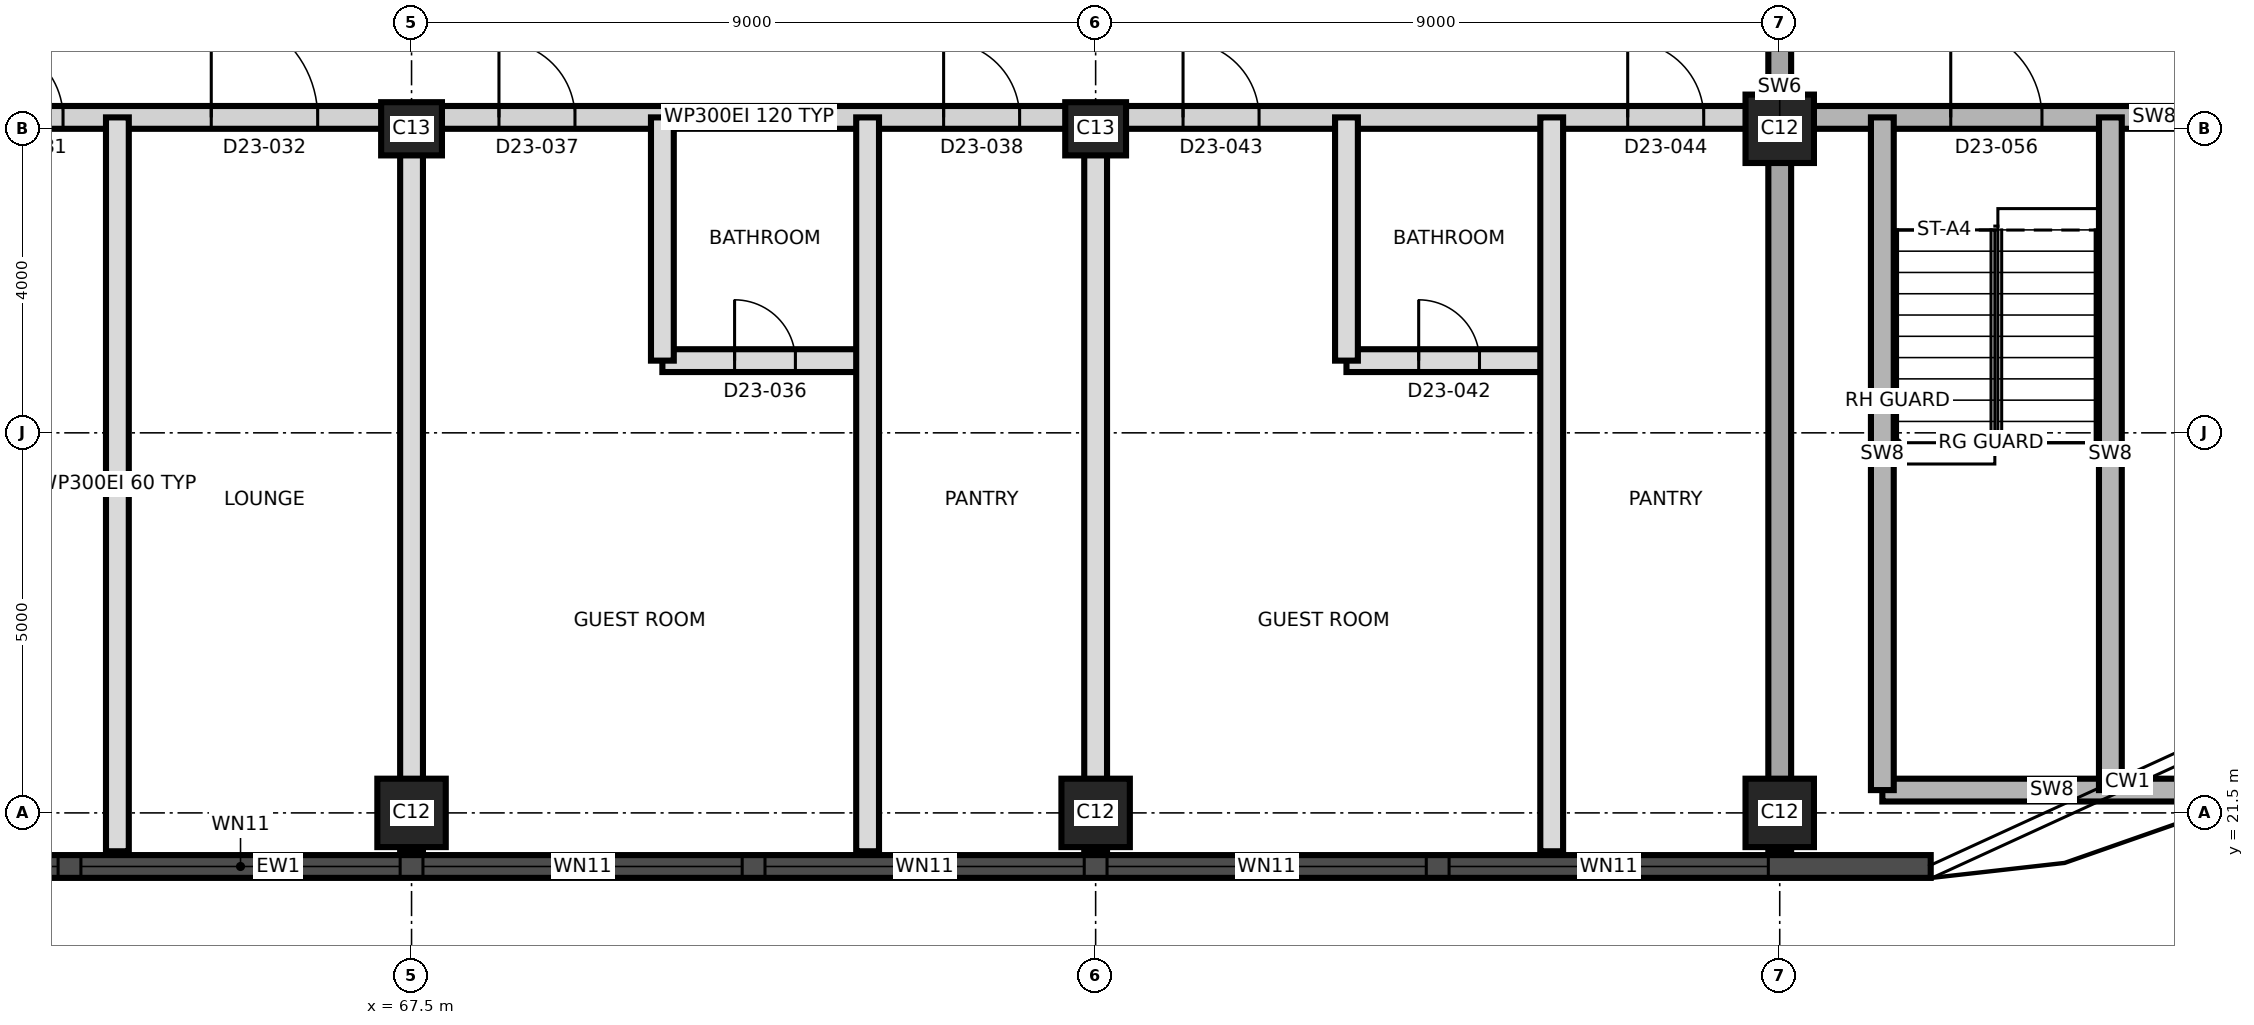
"""IFC4 building model, lengths in metres.
Left out: names, types, materials, properties, quantities, classifications, styles, units other than length and angle.
Written with IfcOpenShell. Run it as: python <this file> out.ifc"""

import sys

from ifc_helpers import new_model, si_unit, direction, frame, frame_2d, origin, origin_2d, place, context, subcontext, project, spatial, rectangle, extrude, element, fill, save


model = new_model("IFC4")
c1 = context("Model", 3, precision=1e-05, world=origin(), true_north=direction((0.0, 1.0)))
c2 = subcontext(c1, "Body", "Model", "MODEL_VIEW")
j1 = project(units=[si_unit("LENGTHUNIT", "METRE"), si_unit("PLANEANGLEUNIT", "RADIAN")], contexts=[c1])
p1 = place(None, origin())
s1 = spatial("IfcSite", under=j1, at=p1, CompositionType="ELEMENT")
p2 = place(p1, origin())
s2 = spatial("IfcBuilding", under=s1, at=p2, CompositionType="ELEMENT")
p3 = place(p2, frame((0.0, 0.0, 206.9)))
s3 = spatial("IfcBuildingStorey", under=s2, at=p3, CompositionType="ELEMENT", Elevation=206.9)
for number, where, z_axis, x_axis in (
    (1, (67.5, 21.5, 0.0), (0.0, 0.0, 1.0), (1.0, 0.0, 0.0)),
    (2, (76.5, 21.5, 0.0), (0.0, 0.0, 1.0), (1.0, 0.0, 0.0)),
    (3, (85.5, 21.5, 0.0), (0.0, 0.0, 1.0), (1.0, 0.0, 0.0)),
):
    element("IfcColumn", number, at=place(p3, frame(where, z_axis=z_axis, x_axis=x_axis)), inside=s3, PredefinedType="COLUMN", context=c2, shape_type="SweptSolid", body=[
        extrude(rectangle(XDim=0.9, YDim=0.9, at=origin_2d()), origin(), (0.0, 0.0, 1.0), 3.7),
    ])
for number, where, z_axis, x_axis in (
    (4, (67.5, 30.5, 0.0), (0.0, 0.0, 1.0), (1.0, 0.0, 0.0)),
    (5, (76.5, 30.5, 0.0), (0.0, 0.0, 1.0), (1.0, 0.0, 0.0)),
):
    element("IfcColumn", number, at=place(p3, frame(where, z_axis=z_axis, x_axis=x_axis)), inside=s3, PredefinedType="COLUMN", context=c2, shape_type="SweptSolid", body=[
        extrude(rectangle(XDim=0.8, YDim=0.7, at=origin_2d()), origin(), (0.0, 0.0, 1.0), 3.7),
    ])
p4 = place(p3, frame((85.5, 30.5, 0.0), z_axis=(0.0, 0.0, 1.0), x_axis=(1.0, 0.0, 0.0)))
e6 = element("IfcColumn", 6, at=p4, inside=s3, PredefinedType="COLUMN", context=c2, shape_type="SweptSolid", body=[
    extrude(rectangle(XDim=0.9, YDim=0.9, at=origin_2d()), origin(), (0.0, 0.0, 1.0), 3.7),
])
p5 = place(p3, frame((85.5, 20.995, 0.0), z_axis=(0.0, 0.0, 1.0), x_axis=(0.0, 1.0, 0.0)))
e7 = element("IfcWall", 7, at=p5, inside=s3, PredefinedType="SHEAR", context=c2, shape_type="SweptSolid", body=[
    extrude(rectangle(XDim=19.01, YDim=0.3, at=frame_2d((9.505, 0.0))), origin(), (0.0, 0.0, 1.0), 3.7),
])
p6 = place(p5, frame((10.705, 0.0, 0.0)))
e8 = element("IfcOpeningElement", 8, at=p6, cuts=e7, PredefinedType="OPENING", context=c2, shape_type="SweptSolid", body=[
    extrude(rectangle(XDim=1.4, YDim=2.1, at=frame_2d((0.7, 1.05))), frame((0.0, 0.16, 0.0), z_axis=(0.0, -1.0, 0.0), x_axis=(1.0, 0.0, 0.0)), (0.0, 0.0, 1.0), 0.32),
])
p7 = place(p3, frame((44.011, 20.795, 0.0), z_axis=(0.0, 0.0, 1.0), x_axis=(1.0, 0.0, 0.0)))
e9 = element("IfcWall", 9, at=p7, inside=s3, PredefinedType="SOLIDWALL", context=c2, shape_type="SweptSolid", body=[
    extrude(rectangle(XDim=43.476, YDim=0.3, at=frame_2d((21.738, 0.0))), origin(), (0.0, 0.0, 1.0), 3.4),
])
p8 = place(p7, frame((1.845, 0.0, 0.3)))
e10 = element("IfcOpeningElement", 10, at=p8, cuts=e9, PredefinedType="OPENING", context=c2, shape_type="SweptSolid", body=[
    extrude(rectangle(XDim=1.8, YDim=2.4, at=frame_2d((0.9, 1.2))), frame((0.0, 0.16, 0.0), z_axis=(0.0, -1.0, 0.0), x_axis=(1.0, 0.0, 0.0)), (0.0, 0.0, 1.0), 0.32),
])
p9 = place(p7, frame((5.639, 0.0, 0.9)))
e11 = element("IfcOpeningElement", 11, at=p9, cuts=e9, PredefinedType="OPENING", context=c2, shape_type="SweptSolid", body=[
    extrude(rectangle(XDim=4.2, YDim=1.5, at=frame_2d((2.1, 0.75))), frame((0.0, 0.16, 0.0), z_axis=(0.0, -1.0, 0.0), x_axis=(1.0, 0.0, 0.0)), (0.0, 0.0, 1.0), 0.32),
])
p10 = place(p7, frame((10.139, 0.0, 0.9)))
e12 = element("IfcOpeningElement", 12, at=p10, cuts=e9, PredefinedType="OPENING", context=c2, shape_type="SweptSolid", body=[
    extrude(rectangle(XDim=4.2, YDim=1.5, at=frame_2d((2.1, 0.75))), frame((0.0, 0.16, 0.0), z_axis=(0.0, -1.0, 0.0), x_axis=(1.0, 0.0, 0.0)), (0.0, 0.0, 1.0), 0.32),
])
p11 = place(p7, frame((14.639, 0.0, 0.9)))
e13 = element("IfcOpeningElement", 13, at=p11, cuts=e9, PredefinedType="OPENING", context=c2, shape_type="SweptSolid", body=[
    extrude(rectangle(XDim=4.2, YDim=1.5, at=frame_2d((2.1, 0.75))), frame((0.0, 0.16, 0.0), z_axis=(0.0, -1.0, 0.0), x_axis=(1.0, 0.0, 0.0)), (0.0, 0.0, 1.0), 0.32),
])
p12 = place(p7, frame((19.139, 0.0, 0.9)))
e14 = element("IfcOpeningElement", 14, at=p12, cuts=e9, PredefinedType="OPENING", context=c2, shape_type="SweptSolid", body=[
    extrude(rectangle(XDim=4.2, YDim=1.5, at=frame_2d((2.1, 0.75))), frame((0.0, 0.16, 0.0), z_axis=(0.0, -1.0, 0.0), x_axis=(1.0, 0.0, 0.0)), (0.0, 0.0, 1.0), 0.32),
])
p13 = place(p7, frame((23.639, 0.0, 0.9)))
e15 = element("IfcOpeningElement", 15, at=p13, cuts=e9, PredefinedType="OPENING", context=c2, shape_type="SweptSolid", body=[
    extrude(rectangle(XDim=4.2, YDim=1.5, at=frame_2d((2.1, 0.75))), frame((0.0, 0.16, 0.0), z_axis=(0.0, -1.0, 0.0), x_axis=(1.0, 0.0, 0.0)), (0.0, 0.0, 1.0), 0.32),
])
p14 = place(p7, frame((28.139, 0.0, 0.9)))
e16 = element("IfcOpeningElement", 16, at=p14, cuts=e9, PredefinedType="OPENING", context=c2, shape_type="SweptSolid", body=[
    extrude(rectangle(XDim=4.2, YDim=1.5, at=frame_2d((2.1, 0.75))), frame((0.0, 0.16, 0.0), z_axis=(0.0, -1.0, 0.0), x_axis=(1.0, 0.0, 0.0)), (0.0, 0.0, 1.0), 0.32),
])
p15 = place(p7, frame((32.639, 0.0, 0.9)))
e17 = element("IfcOpeningElement", 17, at=p15, cuts=e9, PredefinedType="OPENING", context=c2, shape_type="SweptSolid", body=[
    extrude(rectangle(XDim=4.2, YDim=1.5, at=frame_2d((2.1, 0.75))), frame((0.0, 0.16, 0.0), z_axis=(0.0, -1.0, 0.0), x_axis=(1.0, 0.0, 0.0)), (0.0, 0.0, 1.0), 0.32),
])
p16 = place(p7, frame((37.139, 0.0, 0.9)))
e18 = element("IfcOpeningElement", 18, at=p16, cuts=e9, PredefinedType="OPENING", context=c2, shape_type="SweptSolid", body=[
    extrude(rectangle(XDim=4.2, YDim=1.5, at=frame_2d((2.1, 0.75))), frame((0.0, 0.16, 0.0), z_axis=(0.0, -1.0, 0.0), x_axis=(1.0, 0.0, 0.0)), (0.0, 0.0, 1.0), 0.32),
])
p17 = place(p3, frame((86.85, 21.8, 0.0), z_axis=(0.0, 0.0, 1.0), x_axis=(1.0, 0.0, 0.0)))
e19 = element("IfcWall", 19, at=p17, inside=s3, PredefinedType="SHEAR", context=c2, shape_type="SweptSolid", body=[
    extrude(rectangle(XDim=4.46, YDim=0.3, at=frame_2d((2.23, 0.0))), origin(), (0.0, 0.0, 1.0), 3.4),
])
p18 = place(p3, frame((70.8, 27.45, 0.0), z_axis=(0.0, 0.0, 1.0), x_axis=(1.0, 0.0, 0.0)))
e20 = element("IfcWall", 20, at=p18, inside=s3, PredefinedType="PARTITIONING", context=c2, shape_type="SweptSolid", body=[
    extrude(rectangle(XDim=2.7, YDim=0.3, at=frame_2d((1.35, 0.0))), origin(), (0.0, 0.0, 1.0), 3.4),
])
p19 = place(p18, frame((0.95, 0.0, 0.0)))
e21 = element("IfcOpeningElement", 21, at=p19, cuts=e20, PredefinedType="OPENING", context=c2, shape_type="SweptSolid", body=[
    extrude(rectangle(XDim=0.8, YDim=2.1, at=frame_2d((0.4, 1.05))), frame((0.0, 0.16, 0.0), z_axis=(0.0, -1.0, 0.0), x_axis=(1.0, 0.0, 0.0)), (0.0, 0.0, 1.0), 0.32),
])
p20 = place(p3, frame((79.8, 27.45, 0.0), z_axis=(0.0, 0.0, 1.0), x_axis=(1.0, 0.0, 0.0)))
e22 = element("IfcWall", 22, at=p20, inside=s3, PredefinedType="PARTITIONING", context=c2, shape_type="SweptSolid", body=[
    extrude(rectangle(XDim=2.7, YDim=0.3, at=frame_2d((1.35, 0.0))), origin(), (0.0, 0.0, 1.0), 3.4),
])
p21 = place(p20, frame((0.95, 0.0, 0.0)))
e23 = element("IfcOpeningElement", 23, at=p21, cuts=e22, PredefinedType="OPENING", context=c2, shape_type="SweptSolid", body=[
    extrude(rectangle(XDim=0.8, YDim=2.1, at=frame_2d((0.4, 1.05))), frame((0.0, 0.16, 0.0), z_axis=(0.0, -1.0, 0.0), x_axis=(1.0, 0.0, 0.0)), (0.0, 0.0, 1.0), 0.32),
])
p22 = place(p3, frame((58.55, 30.65, 0.0), z_axis=(0.0, 0.0, 1.0), x_axis=(1.0, 0.0, 0.0)))
e24 = element("IfcWall", 24, at=p22, inside=s3, PredefinedType="PARTITIONING", context=c2, shape_type="SweptSolid", body=[
    extrude(rectangle(XDim=26.78, YDim=0.3, at=frame_2d((13.39, 0.0))), origin(), (0.0, 0.0, 1.0), 3.4),
])
p23 = place(p22, frame((3.365, 0.0, 0.0)))
e25 = element("IfcOpeningElement", 25, at=p23, cuts=e24, PredefinedType="OPENING", context=c2, shape_type="SweptSolid", body=[
    extrude(rectangle(XDim=1.0, YDim=2.1, at=frame_2d((0.5, 1.05))), frame((0.0, 0.16, 0.0), z_axis=(0.0, -1.0, 0.0), x_axis=(1.0, 0.0, 0.0)), (0.0, 0.0, 1.0), 0.32),
])
p24 = place(p22, frame((6.315, 0.0, 0.0)))
e26 = element("IfcOpeningElement", 26, at=p24, cuts=e24, PredefinedType="OPENING", context=c2, shape_type="SweptSolid", body=[
    extrude(rectangle(XDim=1.4, YDim=2.1, at=frame_2d((0.7, 1.05))), frame((0.0, 0.16, 0.0), z_axis=(0.0, -1.0, 0.0), x_axis=(1.0, 0.0, 0.0)), (0.0, 0.0, 1.0), 0.32),
])
p25 = place(p22, frame((10.1, 0.0, 0.0)))
e27 = element("IfcOpeningElement", 27, at=p25, cuts=e24, PredefinedType="OPENING", context=c2, shape_type="SweptSolid", body=[
    extrude(rectangle(XDim=1.0, YDim=2.1, at=frame_2d((0.5, 1.05))), frame((0.0, 0.16, 0.0), z_axis=(0.0, -1.0, 0.0), x_axis=(1.0, 0.0, 0.0)), (0.0, 0.0, 1.0), 0.32),
])
p26 = place(p22, frame((15.95, 0.0, 0.0)))
e28 = element("IfcOpeningElement", 28, at=p26, cuts=e24, PredefinedType="OPENING", context=c2, shape_type="SweptSolid", body=[
    extrude(rectangle(XDim=1.0, YDim=2.1, at=frame_2d((0.5, 1.05))), frame((0.0, 0.16, 0.0), z_axis=(0.0, -1.0, 0.0), x_axis=(1.0, 0.0, 0.0)), (0.0, 0.0, 1.0), 0.32),
])
p27 = place(p22, frame((19.1, 0.0, 0.0)))
e29 = element("IfcOpeningElement", 29, at=p27, cuts=e24, PredefinedType="OPENING", context=c2, shape_type="SweptSolid", body=[
    extrude(rectangle(XDim=1.0, YDim=2.1, at=frame_2d((0.5, 1.05))), frame((0.0, 0.16, 0.0), z_axis=(0.0, -1.0, 0.0), x_axis=(1.0, 0.0, 0.0)), (0.0, 0.0, 1.0), 0.32),
])
p28 = place(p22, frame((24.95, 0.0, 0.0)))
e30 = element("IfcOpeningElement", 30, at=p28, cuts=e24, PredefinedType="OPENING", context=c2, shape_type="SweptSolid", body=[
    extrude(rectangle(XDim=1.0, YDim=2.1, at=frame_2d((0.5, 1.05))), frame((0.0, 0.16, 0.0), z_axis=(0.0, -1.0, 0.0), x_axis=(1.0, 0.0, 0.0)), (0.0, 0.0, 1.0), 0.32),
])
p29 = place(p3, frame((85.67, 30.65, 0.0), z_axis=(0.0, 0.0, 1.0), x_axis=(1.0, 0.0, 0.0)))
e31 = element("IfcWall", 31, at=p29, inside=s3, PredefinedType="SHEAR", context=c2, shape_type="SweptSolid", body=[
    extrude(rectangle(XDim=9.515, YDim=0.3, at=frame_2d((4.758, 0.0))), origin(), (0.0, 0.0, 1.0), 3.4),
])
p30 = place(p29, frame((2.08, 0.0, 0.0)))
e32 = element("IfcOpeningElement", 32, at=p30, cuts=e31, PredefinedType="OPENING", context=c2, shape_type="SweptSolid", body=[
    extrude(rectangle(XDim=1.2, YDim=2.1, at=frame_2d((0.6, 1.05))), frame((0.0, 0.16, 0.0), z_axis=(0.0, -1.0, 0.0), x_axis=(1.0, 0.0, 0.0)), (0.0, 0.0, 1.0), 0.32),
])
p31 = place(p29, frame((5.63, 0.0, 0.0)))
e33 = element("IfcOpeningElement", 33, at=p31, cuts=e31, PredefinedType="OPENING", context=c2, shape_type="SweptSolid", body=[
    extrude(rectangle(XDim=1.0, YDim=2.1, at=frame_2d((0.5, 1.05))), frame((0.0, 0.16, 0.0), z_axis=(0.0, -1.0, 0.0), x_axis=(1.0, 0.0, 0.0)), (0.0, 0.0, 1.0), 0.32),
])
for number, where, z_axis, x_axis in (
    (34, (63.63, 20.995, 0.0), (0.0, 0.0, 1.0), (0.0, 1.0, 0.0)),
    (35, (67.5, 20.995, 0.0), (0.0, 0.0, 1.0), (0.0, 1.0, 0.0)),
):
    element("IfcWall", number, at=place(p3, frame(where, z_axis=z_axis, x_axis=x_axis)), inside=s3, PredefinedType="PARTITIONING", context=c2, shape_type="SweptSolid", body=[
        extrude(rectangle(XDim=9.655, YDim=0.3, at=frame_2d((4.827, 0.0))), origin(), (0.0, 0.0, 1.0), 3.4),
    ])
p32 = place(p3, frame((70.8, 27.45, 0.0), z_axis=(0.0, 0.0, 1.0), x_axis=(0.0, 1.0, 0.0)))
e36 = element("IfcWall", 36, at=p32, inside=s3, PredefinedType="PARTITIONING", context=c2, shape_type="SweptSolid", body=[
    extrude(rectangle(XDim=3.2, YDim=0.3, at=frame_2d((1.6, 0.0))), origin(), (0.0, 0.0, 1.0), 3.4),
])
for number, where, z_axis, x_axis in (
    (37, (73.5, 20.995, 0.0), (0.0, 0.0, 1.0), (0.0, 1.0, 0.0)),
    (38, (76.5, 20.995, 0.0), (0.0, 0.0, 1.0), (0.0, 1.0, 0.0)),
):
    element("IfcWall", number, at=place(p3, frame(where, z_axis=z_axis, x_axis=x_axis)), inside=s3, PredefinedType="PARTITIONING", context=c2, shape_type="SweptSolid", body=[
        extrude(rectangle(XDim=9.655, YDim=0.3, at=frame_2d((4.827, 0.0))), origin(), (0.0, 0.0, 1.0), 3.4),
    ])
p33 = place(p3, frame((79.8, 27.45, 0.0), z_axis=(0.0, 0.0, 1.0), x_axis=(0.0, 1.0, 0.0)))
e39 = element("IfcWall", 39, at=p33, inside=s3, PredefinedType="PARTITIONING", context=c2, shape_type="SweptSolid", body=[
    extrude(rectangle(XDim=3.2, YDim=0.3, at=frame_2d((1.6, 0.0))), origin(), (0.0, 0.0, 1.0), 3.4),
])
p34 = place(p3, frame((82.5, 20.995, 0.0), z_axis=(0.0, 0.0, 1.0), x_axis=(0.0, 1.0, 0.0)))
e40 = element("IfcWall", 40, at=p34, inside=s3, PredefinedType="PARTITIONING", context=c2, shape_type="SweptSolid", body=[
    extrude(rectangle(XDim=9.655, YDim=0.3, at=frame_2d((4.827, 0.0))), origin(), (0.0, 0.0, 1.0), 3.4),
])
for number, where, z_axis, x_axis in (
    (41, (86.85, 21.8, 0.0), (0.0, 0.0, 1.0), (0.0, 1.0, 0.0)),
    (42, (89.85, 21.8, 0.0), (0.0, 0.0, 1.0), (0.0, 1.0, 0.0)),
):
    element("IfcWall", number, at=place(p3, frame(where, z_axis=z_axis, x_axis=x_axis)), inside=s3, PredefinedType="SHEAR", context=c2, shape_type="SweptSolid", body=[
        extrude(rectangle(XDim=8.85, YDim=0.3, at=frame_2d((4.425, 0.0))), origin(), (0.0, 0.0, 1.0), 3.4),
    ])
p35 = place(p11, origin())
e43 = element("IfcWindow", 43, at=p35, inside=s3, PartitioningType="SINGLE_PANEL", PredefinedType="WINDOW", context=c2, shape_type="SweptSolid", body=[
    extrude(rectangle(XDim=4.2, YDim=1.5, at=frame_2d((2.1, 0.75))), frame((0.0, 0.03, 0.0), z_axis=(0.0, -1.0, 0.0), x_axis=(1.0, 0.0, 0.0)), (0.0, 0.0, 1.0), 0.06),
])
fill(e13, e43)
p36 = place(p12, origin())
e44 = element("IfcWindow", 44, at=p36, inside=s3, PartitioningType="SINGLE_PANEL", PredefinedType="WINDOW", context=c2, shape_type="SweptSolid", body=[
    extrude(rectangle(XDim=4.2, YDim=1.5, at=frame_2d((2.1, 0.75))), frame((0.0, 0.03, 0.0), z_axis=(0.0, -1.0, 0.0), x_axis=(1.0, 0.0, 0.0)), (0.0, 0.0, 1.0), 0.06),
])
fill(e14, e44)
p37 = place(p13, origin())
e45 = element("IfcWindow", 45, at=p37, inside=s3, PartitioningType="SINGLE_PANEL", PredefinedType="WINDOW", context=c2, shape_type="SweptSolid", body=[
    extrude(rectangle(XDim=4.2, YDim=1.5, at=frame_2d((2.1, 0.75))), frame((0.0, 0.03, 0.0), z_axis=(0.0, -1.0, 0.0), x_axis=(1.0, 0.0, 0.0)), (0.0, 0.0, 1.0), 0.06),
])
fill(e15, e45)
p38 = place(p14, origin())
e46 = element("IfcWindow", 46, at=p38, inside=s3, PartitioningType="SINGLE_PANEL", PredefinedType="WINDOW", context=c2, shape_type="SweptSolid", body=[
    extrude(rectangle(XDim=4.2, YDim=1.5, at=frame_2d((2.1, 0.75))), frame((0.0, 0.03, 0.0), z_axis=(0.0, -1.0, 0.0), x_axis=(1.0, 0.0, 0.0)), (0.0, 0.0, 1.0), 0.06),
])
fill(e16, e46)
p39 = place(p15, origin())
e47 = element("IfcWindow", 47, at=p39, inside=s3, PartitioningType="SINGLE_PANEL", PredefinedType="WINDOW", context=c2, shape_type="SweptSolid", body=[
    extrude(rectangle(XDim=4.2, YDim=1.5, at=frame_2d((2.1, 0.75))), frame((0.0, 0.03, 0.0), z_axis=(0.0, -1.0, 0.0), x_axis=(1.0, 0.0, 0.0)), (0.0, 0.0, 1.0), 0.06),
])
fill(e17, e47)
p40 = place(p16, origin())
e48 = element("IfcWindow", 48, at=p40, inside=s3, PartitioningType="SINGLE_PANEL", PredefinedType="WINDOW", context=c2, shape_type="SweptSolid", body=[
    extrude(rectangle(XDim=4.2, YDim=1.5, at=frame_2d((2.1, 0.75))), frame((0.0, 0.03, 0.0), z_axis=(0.0, -1.0, 0.0), x_axis=(1.0, 0.0, 0.0)), (0.0, 0.0, 1.0), 0.06),
])
fill(e18, e48)
p41 = place(p23, origin())
e49 = element("IfcDoor", 49, at=p41, inside=s3, OperationType="SINGLE_SWING_LEFT", PredefinedType="DOOR", context=c2, shape_type="SweptSolid", body=[
    extrude(rectangle(XDim=1.0, YDim=2.1, at=frame_2d((0.5, 1.05))), frame((0.0, 0.025, 0.0), z_axis=(0.0, -1.0, 0.0), x_axis=(1.0, 0.0, 0.0)), (0.0, 0.0, 1.0), 0.05),
])
fill(e25, e49)
p42 = place(p24, origin())
e50 = element("IfcDoor", 50, at=p42, inside=s3, OperationType="SINGLE_SWING_RIGHT", PredefinedType="DOOR", context=c2, shape_type="SweptSolid", body=[
    extrude(rectangle(XDim=1.4, YDim=2.1, at=frame_2d((0.7, 1.05))), frame((0.0, 0.025, 0.0), z_axis=(0.0, -1.0, 0.0), x_axis=(1.0, 0.0, 0.0)), (0.0, 0.0, 1.0), 0.05),
])
fill(e26, e50)
p43 = place(p19, origin())
e51 = element("IfcDoor", 51, at=p43, inside=s3, OperationType="SINGLE_SWING_LEFT", PredefinedType="DOOR", context=c2, shape_type="SweptSolid", body=[
    extrude(rectangle(XDim=0.8, YDim=2.1, at=frame_2d((0.4, 1.05))), frame((0.0, 0.025, 0.0), z_axis=(0.0, -1.0, 0.0), x_axis=(1.0, 0.0, 0.0)), (0.0, 0.0, 1.0), 0.05),
])
fill(e21, e51)
p44 = place(p25, origin())
e52 = element("IfcDoor", 52, at=p44, inside=s3, OperationType="SINGLE_SWING_LEFT", PredefinedType="DOOR", context=c2, shape_type="SweptSolid", body=[
    extrude(rectangle(XDim=1.0, YDim=2.1, at=frame_2d((0.5, 1.05))), frame((0.0, 0.025, 0.0), z_axis=(0.0, -1.0, 0.0), x_axis=(1.0, 0.0, 0.0)), (0.0, 0.0, 1.0), 0.05),
])
fill(e27, e52)
p45 = place(p26, origin())
e53 = element("IfcDoor", 53, at=p45, inside=s3, OperationType="SINGLE_SWING_RIGHT", PredefinedType="DOOR", context=c2, shape_type="SweptSolid", body=[
    extrude(rectangle(XDim=1.0, YDim=2.1, at=frame_2d((0.5, 1.05))), frame((0.0, 0.025, 0.0), z_axis=(0.0, -1.0, 0.0), x_axis=(1.0, 0.0, 0.0)), (0.0, 0.0, 1.0), 0.05),
])
fill(e28, e53)
p46 = place(p21, origin())
e54 = element("IfcDoor", 54, at=p46, inside=s3, OperationType="SINGLE_SWING_LEFT", PredefinedType="DOOR", context=c2, shape_type="SweptSolid", body=[
    extrude(rectangle(XDim=0.8, YDim=2.1, at=frame_2d((0.4, 1.05))), frame((0.0, 0.025, 0.0), z_axis=(0.0, -1.0, 0.0), x_axis=(1.0, 0.0, 0.0)), (0.0, 0.0, 1.0), 0.05),
])
fill(e23, e54)
p47 = place(p27, origin())
e55 = element("IfcDoor", 55, at=p47, inside=s3, OperationType="SINGLE_SWING_LEFT", PredefinedType="DOOR", context=c2, shape_type="SweptSolid", body=[
    extrude(rectangle(XDim=1.0, YDim=2.1, at=frame_2d((0.5, 1.05))), frame((0.0, 0.025, 0.0), z_axis=(0.0, -1.0, 0.0), x_axis=(1.0, 0.0, 0.0)), (0.0, 0.0, 1.0), 0.05),
])
fill(e29, e55)
p48 = place(p28, origin())
e56 = element("IfcDoor", 56, at=p48, inside=s3, OperationType="SINGLE_SWING_RIGHT", PredefinedType="DOOR", context=c2, shape_type="SweptSolid", body=[
    extrude(rectangle(XDim=1.0, YDim=2.1, at=frame_2d((0.5, 1.05))), frame((0.0, 0.025, 0.0), z_axis=(0.0, -1.0, 0.0), x_axis=(1.0, 0.0, 0.0)), (0.0, 0.0, 1.0), 0.05),
])
fill(e30, e56)
p49 = place(p30, origin())
e57 = element("IfcDoor", 57, at=p49, inside=s3, OperationType="SINGLE_SWING_LEFT", PredefinedType="DOOR", context=c2, shape_type="SweptSolid", body=[
    extrude(rectangle(XDim=1.2, YDim=2.1, at=frame_2d((0.6, 1.05))), frame((0.0, 0.025, 0.0), z_axis=(0.0, -1.0, 0.0), x_axis=(1.0, 0.0, 0.0)), (0.0, 0.0, 1.0), 0.05),
])
fill(e32, e57)
save(model, sys.argv[1])
